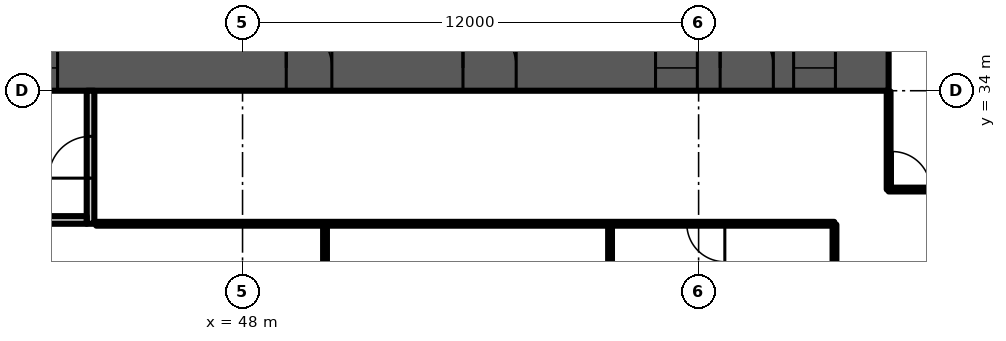
"""IFC4 building model, lengths in metres.
Left out: names, types, materials, properties, quantities, classifications, styles, units other than length and angle.
Written with IfcOpenShell. Run it as: python <this file> out.ifc"""

import sys

from ifc_helpers import new_model, si_unit, direction, frame, frame_2d, origin, place, context, subcontext, project, spatial, rectangle, extrude, element, fill, save


model = new_model("IFC4")
c1 = context("Model", 3, precision=1e-05, world=origin(), true_north=direction((0.0, 1.0)))
c2 = subcontext(c1, "Body", "Model", "MODEL_VIEW")
j1 = project(units=[si_unit("LENGTHUNIT", "METRE"), si_unit("PLANEANGLEUNIT", "RADIAN")], contexts=[c1])
p1 = place(None, origin())
s1 = spatial("IfcSite", under=j1, at=p1, CompositionType="ELEMENT")
p2 = place(p1, origin())
s2 = spatial("IfcBuilding", under=s1, at=p2, CompositionType="ELEMENT")
p3 = place(p2, frame((0.0, 0.0, 48.7)))
s3 = spatial("IfcBuildingStorey", under=s2, at=p3, CompositionType="ELEMENT", Elevation=48.7)
p4 = place(p3, frame((9.0, 34.6, 0.0), z_axis=(0.0, 0.0, 1.0), x_axis=(1.0, 0.0, 0.0)))
e1 = element("IfcWall", 1, at=p4, inside=s3, PredefinedType="SHEAR", context=c2, shape_type="SweptSolid", body=[
    extrude(rectangle(XDim=56.0, YDim=1.2, at=frame_2d((28.0, 0.0))), origin(), (0.0, 0.0, 1.0), 3.6),
])
p5 = place(p4, frame((3.3, 0.0, 0.0)))
e2 = element("IfcOpeningElement", 2, at=p5, cuts=e1, PredefinedType="OPENING", context=c2, shape_type="SweptSolid", body=[
    extrude(rectangle(XDim=1.0, YDim=2.1, at=frame_2d((0.5, 1.05))), frame((0.0, 0.61, 0.0), z_axis=(0.0, -1.0, 0.0), x_axis=(1.0, 0.0, 0.0)), (0.0, 0.0, 1.0), 1.22),
])
p6 = place(p4, frame((7.867, 0.0, 0.0)))
e3 = element("IfcOpeningElement", 3, at=p6, cuts=e1, PredefinedType="OPENING", context=c2, shape_type="SweptSolid", body=[
    extrude(rectangle(XDim=1.1, YDim=2.1, at=frame_2d((0.55, 1.05))), frame((0.0, 0.61, 0.0), z_axis=(0.0, -1.0, 0.0), x_axis=(1.0, 0.0, 0.0)), (0.0, 0.0, 1.0), 1.22),
])
p7 = place(p4, frame((12.033, 0.0, 0.0)))
e4 = element("IfcOpeningElement", 4, at=p7, cuts=e1, PredefinedType="OPENING", context=c2, shape_type="SweptSolid", body=[
    extrude(rectangle(XDim=1.1, YDim=2.1, at=frame_2d((0.55, 1.05))), frame((0.0, 0.61, 0.0), z_axis=(0.0, -1.0, 0.0), x_axis=(1.0, 0.0, 0.0)), (0.0, 0.0, 1.0), 1.22),
])
p8 = place(p4, frame((9.8, 0.0, 0.0)))
e5 = element("IfcOpeningElement", 5, at=p8, cuts=e1, PredefinedType="OPENING", context=c2, shape_type="SweptSolid", body=[
    extrude(rectangle(XDim=1.4, YDim=2.1, at=frame_2d((0.7, 1.05))), frame((0.0, 0.61, 0.0), z_axis=(0.0, -1.0, 0.0), x_axis=(1.0, 0.0, 0.0)), (0.0, 0.0, 1.0), 1.22),
])
p9 = place(p4, frame((14.65, 0.0, 0.0)))
e6 = element("IfcOpeningElement", 6, at=p9, cuts=e1, PredefinedType="OPENING", context=c2, shape_type="SweptSolid", body=[
    extrude(rectangle(XDim=1.2, YDim=2.1, at=frame_2d((0.6, 1.05))), frame((0.0, 0.61, 0.0), z_axis=(0.0, -1.0, 0.0), x_axis=(1.0, 0.0, 0.0)), (0.0, 0.0, 1.0), 1.22),
])
p10 = place(p4, frame((21.867, 0.0, 0.0)))
e7 = element("IfcOpeningElement", 7, at=p10, cuts=e1, PredefinedType="OPENING", context=c2, shape_type="SweptSolid", body=[
    extrude(rectangle(XDim=1.1, YDim=2.1, at=frame_2d((0.55, 1.05))), frame((0.0, 0.61, 0.0), z_axis=(0.0, -1.0, 0.0), x_axis=(1.0, 0.0, 0.0)), (0.0, 0.0, 1.0), 1.22),
])
p11 = place(p4, frame((26.033, 0.0, 0.0)))
e8 = element("IfcOpeningElement", 8, at=p11, cuts=e1, PredefinedType="OPENING", context=c2, shape_type="SweptSolid", body=[
    extrude(rectangle(XDim=1.1, YDim=2.1, at=frame_2d((0.55, 1.05))), frame((0.0, 0.61, 0.0), z_axis=(0.0, -1.0, 0.0), x_axis=(1.0, 0.0, 0.0)), (0.0, 0.0, 1.0), 1.22),
])
p12 = place(p4, frame((23.8, 0.0, 0.0)))
e9 = element("IfcOpeningElement", 9, at=p12, cuts=e1, PredefinedType="OPENING", context=c2, shape_type="SweptSolid", body=[
    extrude(rectangle(XDim=1.4, YDim=2.1, at=frame_2d((0.7, 1.05))), frame((0.0, 0.61, 0.0), z_axis=(0.0, -1.0, 0.0), x_axis=(1.0, 0.0, 0.0)), (0.0, 0.0, 1.0), 1.22),
])
p13 = place(p4, frame((28.867, 0.0, 0.0)))
e10 = element("IfcOpeningElement", 10, at=p13, cuts=e1, PredefinedType="OPENING", context=c2, shape_type="SweptSolid", body=[
    extrude(rectangle(XDim=1.1, YDim=2.1, at=frame_2d((0.55, 1.05))), frame((0.0, 0.61, 0.0), z_axis=(0.0, -1.0, 0.0), x_axis=(1.0, 0.0, 0.0)), (0.0, 0.0, 1.0), 1.22),
])
p14 = place(p4, frame((33.033, 0.0, 0.0)))
e11 = element("IfcOpeningElement", 11, at=p14, cuts=e1, PredefinedType="OPENING", context=c2, shape_type="SweptSolid", body=[
    extrude(rectangle(XDim=1.1, YDim=2.1, at=frame_2d((0.55, 1.05))), frame((0.0, 0.61, 0.0), z_axis=(0.0, -1.0, 0.0), x_axis=(1.0, 0.0, 0.0)), (0.0, 0.0, 1.0), 1.22),
])
p15 = place(p4, frame((40.15, 0.0, 0.0)))
e12 = element("IfcOpeningElement", 12, at=p15, cuts=e1, PredefinedType="OPENING", context=c2, shape_type="SweptSolid", body=[
    extrude(rectangle(XDim=1.2, YDim=2.1, at=frame_2d((0.6, 1.05))), frame((0.0, 0.61, 0.0), z_axis=(0.0, -1.0, 0.0), x_axis=(1.0, 0.0, 0.0)), (0.0, 0.0, 1.0), 1.22),
])
p16 = place(p4, frame((44.8, 0.0, 0.0)))
e13 = element("IfcOpeningElement", 13, at=p16, cuts=e1, PredefinedType="OPENING", context=c2, shape_type="SweptSolid", body=[
    extrude(rectangle(XDim=1.4, YDim=2.1, at=frame_2d((0.7, 1.05))), frame((0.0, 0.61, 0.0), z_axis=(0.0, -1.0, 0.0), x_axis=(1.0, 0.0, 0.0)), (0.0, 0.0, 1.0), 1.22),
])
p17 = place(p4, frame((49.867, 0.0, 0.0)))
e14 = element("IfcOpeningElement", 14, at=p17, cuts=e1, PredefinedType="OPENING", context=c2, shape_type="SweptSolid", body=[
    extrude(rectangle(XDim=1.1, YDim=2.1, at=frame_2d((0.55, 1.05))), frame((0.0, 0.61, 0.0), z_axis=(0.0, -1.0, 0.0), x_axis=(1.0, 0.0, 0.0)), (0.0, 0.0, 1.0), 1.22),
])
p18 = place(p4, frame((53.5, 0.0, 0.0)))
e15 = element("IfcOpeningElement", 15, at=p18, cuts=e1, PredefinedType="OPENING", context=c2, shape_type="SweptSolid", body=[
    extrude(rectangle(XDim=1.1, YDim=2.1, at=frame_2d((0.55, 1.05))), frame((0.0, 0.61, 0.0), z_axis=(0.0, -1.0, 0.0), x_axis=(1.0, 0.0, 0.0)), (0.0, 0.0, 1.0), 1.22),
])
p19 = place(p4, frame((51.567, 0.0, 0.0)))
e16 = element("IfcOpeningElement", 16, at=p19, cuts=e1, PredefinedType="OPENING", context=c2, shape_type="SweptSolid", body=[
    extrude(rectangle(XDim=1.4, YDim=2.1, at=frame_2d((0.7, 1.05))), frame((0.0, 0.61, 0.0), z_axis=(0.0, -1.0, 0.0), x_axis=(1.0, 0.0, 0.0)), (0.0, 0.0, 1.0), 1.22),
])
p20 = place(p3, frame((44.0, 30.5, 0.0), z_axis=(0.0, 0.0, 1.0), x_axis=(0.0, 1.0, 0.0)))
e17 = element("IfcWall", 17, at=p20, inside=s3, PredefinedType="PARTITIONING", context=c2, shape_type="SweptSolid", body=[
    extrude(rectangle(XDim=3.5, YDim=0.2, at=frame_2d((1.75, 0.0))), origin(), (0.0, 0.0, 1.0), 3.2),
])
p21 = place(p20, frame((1.2, 0.0, 0.0)))
e18 = element("IfcOpeningElement", 18, at=p21, cuts=e17, PredefinedType="OPENING", context=c2, shape_type="SweptSolid", body=[
    extrude(rectangle(XDim=1.1, YDim=2.1, at=frame_2d((0.55, 1.05))), frame((0.0, 0.11, 0.0), z_axis=(0.0, -1.0, 0.0), x_axis=(1.0, 0.0, 0.0)), (0.0, 0.0, 1.0), 0.22),
])
p22 = place(p3, frame((41.1, 30.6, 0.0), z_axis=(0.0, 0.0, 1.0), x_axis=(1.0, 0.0, 0.0)))
e19 = element("IfcWall", 19, at=p22, inside=s3, PredefinedType="PARTITIONING", context=c2, shape_type="SweptSolid", body=[
    extrude(rectangle(XDim=2.8, YDim=0.2, at=frame_2d((1.4, 0.0))), origin(), (0.0, 0.0, 1.0), 3.2),
])
for number, where, z_axis, x_axis in (
    (20, (50.17, 14.24, 0.0), (0.0, 0.0, 1.0), (0.0, 1.0, 0.0)),
    (21, (57.67, 14.24, 0.0), (0.0, 0.0, 1.0), (0.0, 1.0, 0.0)),
):
    element("IfcWall", number, at=place(p3, frame(where, z_axis=z_axis, x_axis=x_axis)), inside=s3, PredefinedType="PARTITIONING", context=c2, shape_type="SweptSolid", body=[
        extrude(rectangle(XDim=16.26, YDim=0.1, at=frame_2d((8.13, 0.0))), origin(), (0.0, 0.0, 1.0), 3.2),
    ])
p23 = place(p3, frame((63.57, 14.245, 0.0), z_axis=(0.0, 0.0, 1.0), x_axis=(0.000331, 1.000002, 0.0)))
e22 = element("IfcWall", 22, at=p23, inside=s3, PredefinedType="PARTITIONING", context=c2, shape_type="SweptSolid", body=[
    extrude(rectangle(XDim=16.233, YDim=0.1, at=frame_2d((8.117, 0.0))), origin(), (0.0, 0.0, 1.0), 3.2),
])
p24 = place(p3, frame((65.0, 31.4, 0.0), z_axis=(0.0, 0.0, 1.0), x_axis=(0.0, 1.0, 0.0)))
e23 = element("IfcWall", 23, at=p24, inside=s3, PredefinedType="PARTITIONING", context=c2, shape_type="SweptSolid", body=[
    extrude(rectangle(XDim=2.58, YDim=0.1, at=frame_2d((1.29, 0.0))), origin(), (0.0, 0.0, 1.0), 3.2),
])
p25 = place(p3, frame((65.0, 31.4, 0.0), z_axis=(0.0, 0.0, 1.0), x_axis=(1.0, 0.0, 0.0)))
e24 = element("IfcWall", 24, at=p25, inside=s3, PredefinedType="PARTITIONING", context=c2, shape_type="SweptSolid", body=[
    extrude(rectangle(XDim=7.125, YDim=0.1, at=frame_2d((3.562, 0.0))), origin(), (0.0, 0.0, 1.0), 3.2),
])
p26 = place(p25, frame((0.1, 0.0, 0.0)))
e25 = element("IfcOpeningElement", 25, at=p26, cuts=e24, PredefinedType="OPENING", context=c2, shape_type="SweptSolid", body=[
    extrude(rectangle(XDim=1.0, YDim=2.1, at=frame_2d((0.5, 1.05))), frame((0.0, 0.06, 0.0), z_axis=(0.0, -1.0, 0.0), x_axis=(1.0, 0.0, 0.0)), (0.0, 0.0, 1.0), 0.12),
])
p27 = place(p25, frame((5.625, 0.0, 0.0)))
e26 = element("IfcOpeningElement", 26, at=p27, cuts=e24, PredefinedType="OPENING", context=c2, shape_type="SweptSolid", body=[
    extrude(rectangle(XDim=1.0, YDim=2.1, at=frame_2d((0.5, 1.05))), frame((0.0, 0.06, 0.0), z_axis=(0.0, -1.0, 0.0), x_axis=(1.0, 0.0, 0.0)), (0.0, 0.0, 1.0), 0.12),
])
p28 = place(p3, frame((44.15, 30.5, 0.0), z_axis=(0.0, 0.0, 1.0), x_axis=(1.0, 0.0, 0.0)))
e27 = element("IfcWall", 27, at=p28, inside=s3, PredefinedType="PARTITIONING", context=c2, shape_type="SweptSolid", body=[
    extrude(rectangle(XDim=19.42, YDim=0.1, at=frame_2d((9.71, 0.0))), origin(), (0.0, 0.0, 1.0), 3.2),
])
p29 = place(p28, frame((15.54, 0.0, 0.0)))
e28 = element("IfcOpeningElement", 28, at=p29, cuts=e27, PredefinedType="OPENING", context=c2, shape_type="SweptSolid", body=[
    extrude(rectangle(XDim=1.0, YDim=2.1, at=frame_2d((0.5, 1.05))), frame((0.0, 0.06, 0.0), z_axis=(0.0, -1.0, 0.0), x_axis=(1.0, 0.0, 0.0)), (0.0, 0.0, 1.0), 0.12),
])
p30 = place(p14, origin())
e29 = element("IfcDoor", 29, at=p30, inside=s3, OperationType="DOUBLE_DOOR_SLIDING", PredefinedType="DOOR", context=c2, shape_type="SweptSolid", body=[
    extrude(rectangle(XDim=1.1, YDim=2.1, at=frame_2d((0.55, 1.05))), frame((0.0, 0.025, 0.0), z_axis=(0.0, -1.0, 0.0), x_axis=(1.0, 0.0, 0.0)), (0.0, 0.0, 1.0), 0.05),
])
fill(e11, e29)
p31 = place(p15, origin())
e30 = element("IfcDoor", 30, at=p31, inside=s3, OperationType="SINGLE_SWING_LEFT", PredefinedType="DOOR", context=c2, shape_type="SweptSolid", body=[
    extrude(rectangle(XDim=1.2, YDim=2.1, at=frame_2d((0.6, 1.05))), frame((0.0, 0.025, 0.0), z_axis=(0.0, -1.0, 0.0), x_axis=(1.0, 0.0, 0.0)), (0.0, 0.0, 1.0), 0.05),
])
fill(e12, e30)
p32 = place(p16, origin())
e31 = element("IfcDoor", 31, at=p32, inside=s3, OperationType="DOUBLE_DOOR_SINGLE_SWING", PredefinedType="DOOR", context=c2, shape_type="SweptSolid", body=[
    extrude(rectangle(XDim=1.4, YDim=2.1, at=frame_2d((0.7, 1.05))), frame((0.0, 0.025, 0.0), z_axis=(0.0, -1.0, 0.0), x_axis=(1.0, 0.0, 0.0)), (0.0, 0.0, 1.0), 0.05),
])
fill(e13, e31)
p33 = place(p17, origin())
e32 = element("IfcDoor", 32, at=p33, inside=s3, OperationType="DOUBLE_DOOR_SLIDING", PredefinedType="DOOR", context=c2, shape_type="SweptSolid", body=[
    extrude(rectangle(XDim=1.1, YDim=2.1, at=frame_2d((0.55, 1.05))), frame((0.0, 0.025, 0.0), z_axis=(0.0, -1.0, 0.0), x_axis=(1.0, 0.0, 0.0)), (0.0, 0.0, 1.0), 0.05),
])
fill(e14, e32)
p34 = place(p18, origin())
e33 = element("IfcDoor", 33, at=p34, inside=s3, OperationType="DOUBLE_DOOR_SLIDING", PredefinedType="DOOR", context=c2, shape_type="SweptSolid", body=[
    extrude(rectangle(XDim=1.1, YDim=2.1, at=frame_2d((0.55, 1.05))), frame((0.0, 0.025, 0.0), z_axis=(0.0, -1.0, 0.0), x_axis=(1.0, 0.0, 0.0)), (0.0, 0.0, 1.0), 0.05),
])
fill(e15, e33)
p35 = place(p19, origin())
e34 = element("IfcDoor", 34, at=p35, inside=s3, OperationType="DOUBLE_DOOR_SINGLE_SWING", PredefinedType="DOOR", context=c2, shape_type="SweptSolid", body=[
    extrude(rectangle(XDim=1.4, YDim=2.1, at=frame_2d((0.7, 1.05))), frame((0.0, 0.025, 0.0), z_axis=(0.0, -1.0, 0.0), x_axis=(1.0, 0.0, 0.0)), (0.0, 0.0, 1.0), 0.05),
])
fill(e16, e34)
p36 = place(p21, origin())
e35 = element("IfcDoor", 35, at=p36, inside=s3, OperationType="SINGLE_SWING_LEFT", PredefinedType="DOOR", context=c2, shape_type="SweptSolid", body=[
    extrude(rectangle(XDim=1.1, YDim=2.1, at=frame_2d((0.55, 1.05))), frame((0.0, 0.025, 0.0), z_axis=(0.0, -1.0, 0.0), x_axis=(1.0, 0.0, 0.0)), (0.0, 0.0, 1.0), 0.05),
])
fill(e18, e35)
p37 = place(p29, origin())
e36 = element("IfcDoor", 36, at=p37, inside=s3, OperationType="SINGLE_SWING_RIGHT", PredefinedType="DOOR", context=c2, shape_type="SweptSolid", body=[
    extrude(rectangle(XDim=1.0, YDim=2.1, at=frame_2d((0.5, 1.05))), frame((0.0, 0.025, 0.0), z_axis=(0.0, -1.0, 0.0), x_axis=(1.0, 0.0, 0.0)), (0.0, 0.0, 1.0), 0.05),
])
fill(e28, e36)
p38 = place(p26, origin())
e37 = element("IfcDoor", 37, at=p38, inside=s3, OperationType="SINGLE_SWING_LEFT", PredefinedType="DOOR", context=c2, shape_type="SweptSolid", body=[
    extrude(rectangle(XDim=1.0, YDim=2.1, at=frame_2d((0.5, 1.05))), frame((0.0, 0.025, 0.0), z_axis=(0.0, -1.0, 0.0), x_axis=(1.0, 0.0, 0.0)), (0.0, 0.0, 1.0), 0.05),
])
fill(e25, e37)
save(model, sys.argv[1])
